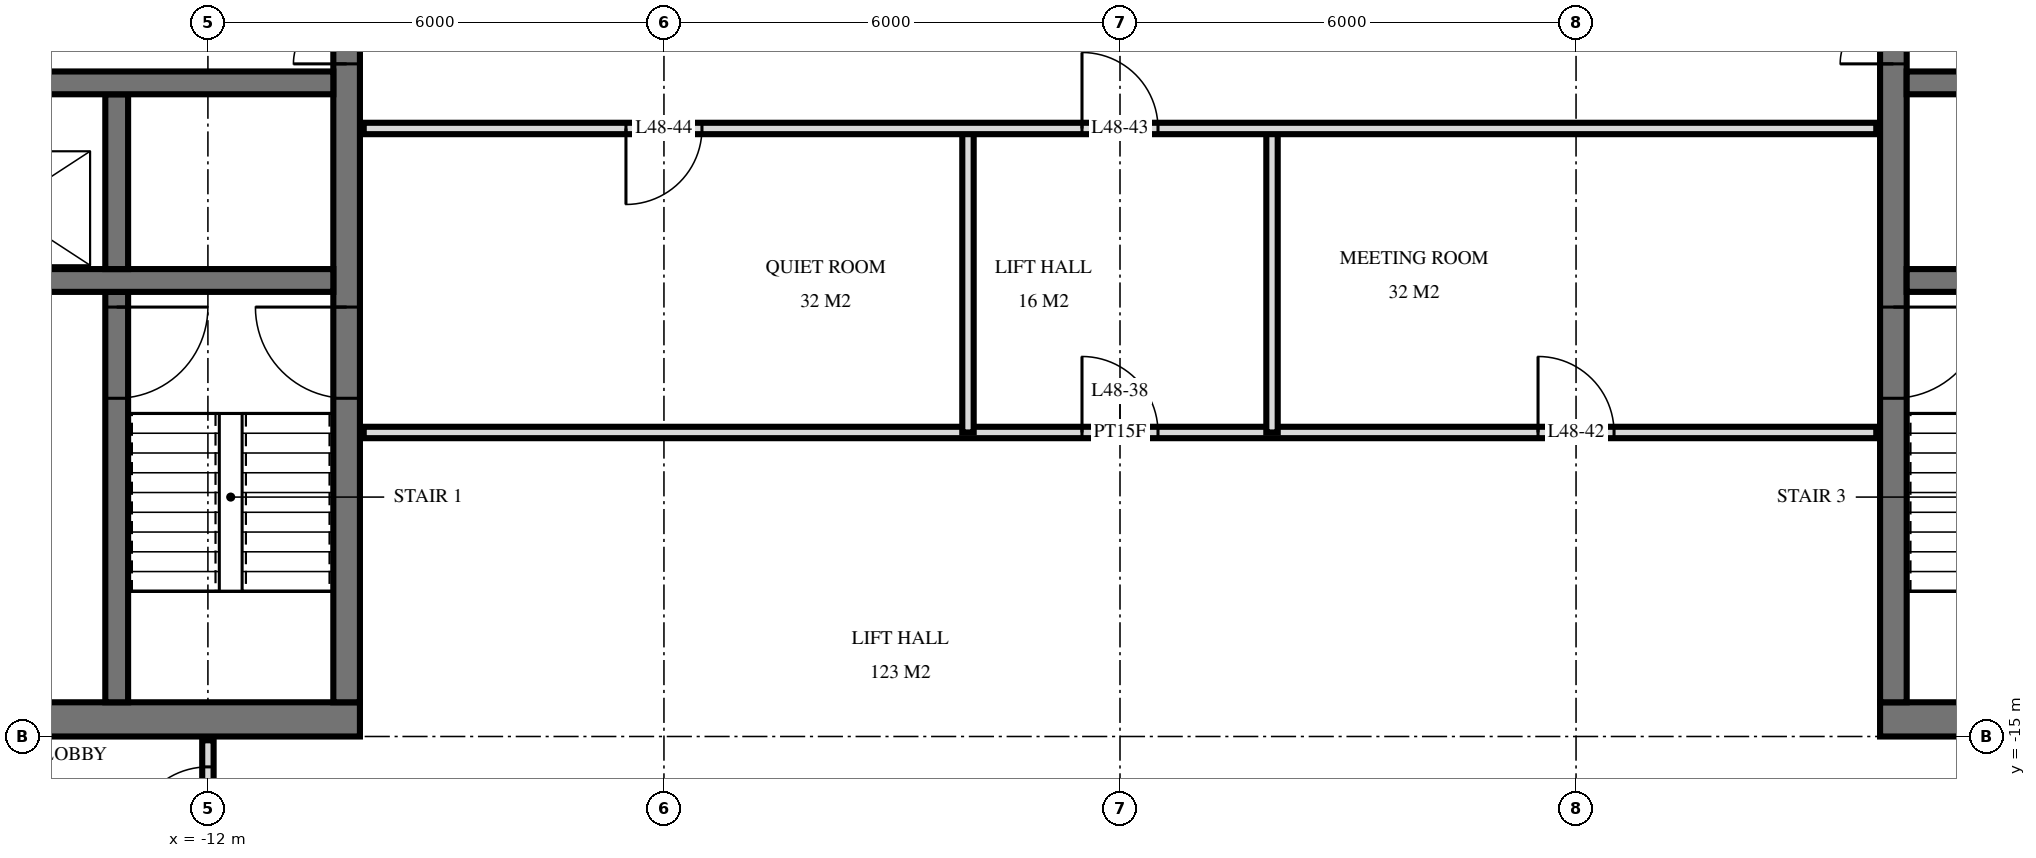
"""IFC4 building model, lengths in metres.
Left out: names, types, materials, properties, quantities, classifications, styles, units other than length and angle.
Written with IfcOpenShell. Run it as: python <this file> out.ifc"""

import sys

from ifc_helpers import new_model, si_unit, direction, frame, frame_2d, origin, place, context, subcontext, project, spatial, rectangle, extrude, element, fill, save


model = new_model("IFC4")
c1 = context("Model", 3, precision=1e-05, world=origin(), true_north=direction((0.0, 1.0)))
c2 = subcontext(c1, "Body", "Model", "MODEL_VIEW")
j1 = project(units=[si_unit("LENGTHUNIT", "METRE"), si_unit("PLANEANGLEUNIT", "RADIAN")], contexts=[c1])
p1 = place(None, origin())
s1 = spatial("IfcSite", under=j1, at=p1, CompositionType="ELEMENT")
p2 = place(p1, origin())
s2 = spatial("IfcBuilding", under=s1, at=p2, CompositionType="ELEMENT")
p3 = place(p2, frame((0.0, 0.0, 187.1)))
s3 = spatial("IfcBuildingStorey", under=s2, at=p3, CompositionType="ELEMENT", Elevation=187.1)
p4 = place(p3, frame((-24.5, -14.775, 0.0), z_axis=(0.0, 0.0, 1.0), x_axis=(1.0, 0.0, 0.0)))
e1 = element("IfcWall", 1, at=p4, inside=s3, PredefinedType="SHEAR", context=c2, shape_type="SweptSolid", body=[
    extrude(rectangle(XDim=14.5, YDim=0.45, at=frame_2d((7.25, 0.0))), origin(), (0.0, 0.0, 1.0), 3.5),
])
p5 = place(p4, frame((6.2, 0.0, 0.0)))
e2 = element("IfcOpeningElement", 2, at=p5, cuts=e1, PredefinedType="OPENING", context=c2, shape_type="SweptSolid", body=[
    extrude(rectangle(XDim=1.2, YDim=2.1, at=frame_2d((0.6, 1.05))), frame((0.0, 0.235, 0.0), z_axis=(0.0, -1.0, 0.0), x_axis=(1.0, 0.0, 0.0)), (0.0, 0.0, 1.0), 0.47),
])
p6 = place(p4, frame((9.25, 0.0, 0.0)))
e3 = element("IfcOpeningElement", 3, at=p6, cuts=e1, PredefinedType="OPENING", context=c2, shape_type="SweptSolid", body=[
    extrude(rectangle(XDim=1.1, YDim=2.1, at=frame_2d((0.55, 1.05))), frame((0.0, 0.235, 0.0), z_axis=(0.0, -1.0, 0.0), x_axis=(1.0, 0.0, 0.0)), (0.0, 0.0, 1.0), 0.47),
])
p7 = place(p4, frame((3.5, 0.0, 0.0)))
e4 = element("IfcOpeningElement", 4, at=p7, cuts=e1, PredefinedType="OPENING", context=c2, shape_type="SweptSolid", body=[
    extrude(rectangle(XDim=0.9, YDim=2.1, at=frame_2d((0.45, 1.05))), frame((0.0, 0.235, 0.0), z_axis=(0.0, -1.0, 0.0), x_axis=(1.0, 0.0, 0.0)), (0.0, 0.0, 1.0), 0.47),
])
p8 = place(p4, frame((1.05, 0.0, 0.0)))
e5 = element("IfcOpeningElement", 5, at=p8, cuts=e1, PredefinedType="OPENING", context=c2, shape_type="SweptSolid", body=[
    extrude(rectangle(XDim=1.0, YDim=2.1, at=frame_2d((0.5, 1.05))), frame((0.0, 0.235, 0.0), z_axis=(0.0, -1.0, 0.0), x_axis=(1.0, 0.0, 0.0)), (0.0, 0.0, 1.0), 0.47),
])
p9 = place(p3, frame((-10.175, -14.55, 0.0), z_axis=(0.0, 0.0, 1.0), x_axis=(0.0, 1.0, 0.0)))
e6 = element("IfcWall", 6, at=p9, inside=s3, PredefinedType="SHEAR", context=c2, shape_type="SweptSolid", body=[
    extrude(rectangle(XDim=14.1, YDim=0.35, at=frame_2d((7.05, 0.0))), origin(), (0.0, 0.0, 1.0), 3.5),
])
p10 = place(p9, frame((8.4, 0.0, 0.0)))
e7 = element("IfcOpeningElement", 7, at=p10, cuts=e6, PredefinedType="OPENING", context=c2, shape_type="SweptSolid", body=[
    extrude(rectangle(XDim=1.4, YDim=2.4, at=frame_2d((0.7, 1.2))), frame((0.0, 0.185, 0.0), z_axis=(0.0, -1.0, 0.0), x_axis=(1.0, 0.0, 0.0)), (0.0, 0.0, 1.0), 0.37),
])
p11 = place(p9, frame((10.0, 0.0, 0.0)))
e8 = element("IfcOpeningElement", 8, at=p11, cuts=e6, PredefinedType="OPENING", context=c2, shape_type="SweptSolid", body=[
    extrude(rectangle(XDim=1.4, YDim=2.4, at=frame_2d((0.7, 1.2))), frame((0.0, 0.185, 0.0), z_axis=(0.0, -1.0, 0.0), x_axis=(1.0, 0.0, 0.0)), (0.0, 0.0, 1.0), 0.37),
])
p12 = place(p9, frame((4.0, 0.0, 0.0)))
e9 = element("IfcOpeningElement", 9, at=p12, cuts=e6, PredefinedType="OPENING", context=c2, shape_type="SweptSolid", body=[
    extrude(rectangle(XDim=1.2, YDim=2.1, at=frame_2d((0.6, 1.05))), frame((0.0, 0.185, 0.0), z_axis=(0.0, -1.0, 0.0), x_axis=(1.0, 0.0, 0.0)), (0.0, 0.0, 1.0), 0.37),
])
p13 = place(p3, frame((-24.05, -6.4, 0.0), z_axis=(0.0, 0.0, 1.0), x_axis=(1.0, 0.0, 0.0)))
e10 = element("IfcWall", 10, at=p13, inside=s3, PredefinedType="SHEAR", context=c2, shape_type="SweptSolid", body=[
    extrude(rectangle(XDim=13.7, YDim=0.3, at=frame_2d((6.85, 0.0))), origin(), (0.0, 0.0, 1.0), 3.5),
])
p14 = place(p13, frame((0.55, 0.0, 0.0)))
e11 = element("IfcOpeningElement", 11, at=p14, cuts=e10, PredefinedType="OPENING", context=c2, shape_type="SweptSolid", body=[
    extrude(rectangle(XDim=1.1, YDim=2.1, at=frame_2d((0.55, 1.05))), frame((0.0, 0.16, 0.0), z_axis=(0.0, -1.0, 0.0), x_axis=(1.0, 0.0, 0.0)), (0.0, 0.0, 1.0), 0.32),
])
p15 = place(p13, frame((5.8, 0.0, 0.0)))
e12 = element("IfcOpeningElement", 12, at=p15, cuts=e10, PredefinedType="OPENING", context=c2, shape_type="SweptSolid", body=[
    extrude(rectangle(XDim=1.1, YDim=2.1, at=frame_2d((0.55, 1.05))), frame((0.0, 0.16, 0.0), z_axis=(0.0, -1.0, 0.0), x_axis=(1.0, 0.0, 0.0)), (0.0, 0.0, 1.0), 0.32),
])
p16 = place(p3, frame((-24.05, -9.0, 0.0), z_axis=(0.0, 0.0, 1.0), x_axis=(1.0, 0.0, 0.0)))
e13 = element("IfcWall", 13, at=p16, inside=s3, PredefinedType="SHEAR", context=c2, shape_type="SweptSolid", body=[
    extrude(rectangle(XDim=13.7, YDim=0.3, at=frame_2d((6.85, 0.0))), origin(), (0.0, 0.0, 1.0), 3.5),
])
p17 = place(p16, frame((8.8, 0.0, 0.0)))
e14 = element("IfcOpeningElement", 14, at=p17, cuts=e13, PredefinedType="OPENING", context=c2, shape_type="SweptSolid", body=[
    extrude(rectangle(XDim=1.1, YDim=2.1, at=frame_2d((0.55, 1.05))), frame((0.0, 0.16, 0.0), z_axis=(0.0, -1.0, 0.0), x_axis=(1.0, 0.0, 0.0)), (0.0, 0.0, 1.0), 0.32),
])
p18 = place(p3, frame((-13.2, -8.85, 0.0), z_axis=(0.0, 0.0, 1.0), x_axis=(0.0, 1.0, 0.0)))
e15 = element("IfcWall", 15, at=p18, inside=s3, PredefinedType="SHEAR", context=c2, shape_type="SweptSolid", body=[
    extrude(rectangle(XDim=2.3, YDim=0.3, at=frame_2d((1.15, 0.0))), origin(), (0.0, 0.0, 1.0), 3.5),
])
p19 = place(p3, frame((-13.2, -14.55, 0.0), z_axis=(0.0, 0.0, 1.0), x_axis=(0.0, 1.0, 0.0)))
e16 = element("IfcWall", 16, at=p19, inside=s3, PredefinedType="SHEAR", context=c2, shape_type="SweptSolid", body=[
    extrude(rectangle(XDim=5.4, YDim=0.3, at=frame_2d((2.7, 0.0))), origin(), (0.0, 0.0, 1.0), 3.5),
])
p20 = place(p19, frame((4.0, 0.0, 0.0)))
e17 = element("IfcOpeningElement", 17, at=p20, cuts=e16, PredefinedType="OPENING", context=c2, shape_type="SweptSolid", body=[
    extrude(rectangle(XDim=1.2, YDim=2.1, at=frame_2d((0.6, 1.05))), frame((0.0, 0.16, 0.0), z_axis=(0.0, -1.0, 0.0), x_axis=(1.0, 0.0, 0.0)), (0.0, 0.0, 1.0), 0.32),
])
p21 = place(p3, frame((10.0, -14.775, 0.0), z_axis=(0.0, 0.0, 1.0), x_axis=(1.0, 0.0, 0.0)))
e18 = element("IfcWall", 18, at=p21, inside=s3, PredefinedType="SHEAR", context=c2, shape_type="SweptSolid", body=[
    extrude(rectangle(XDim=14.5, YDim=0.45, at=frame_2d((7.25, 0.0))), origin(), (0.0, 0.0, 1.0), 3.5),
])
p22 = place(p21, frame((7.1, 0.0, 0.0)))
e19 = element("IfcOpeningElement", 19, at=p22, cuts=e18, PredefinedType="OPENING", context=c2, shape_type="SweptSolid", body=[
    extrude(rectangle(XDim=1.2, YDim=2.1, at=frame_2d((0.6, 1.05))), frame((0.0, 0.235, 0.0), z_axis=(0.0, -1.0, 0.0), x_axis=(1.0, 0.0, 0.0)), (0.0, 0.0, 1.0), 0.47),
])
p23 = place(p21, frame((4.15, 0.0, 0.0)))
e20 = element("IfcOpeningElement", 20, at=p23, cuts=e18, PredefinedType="OPENING", context=c2, shape_type="SweptSolid", body=[
    extrude(rectangle(XDim=1.1, YDim=2.1, at=frame_2d((0.55, 1.05))), frame((0.0, 0.235, 0.0), z_axis=(0.0, -1.0, 0.0), x_axis=(1.0, 0.0, 0.0)), (0.0, 0.0, 1.0), 0.47),
])
p24 = place(p21, frame((10.1, 0.0, 0.0)))
e21 = element("IfcOpeningElement", 21, at=p24, cuts=e18, PredefinedType="OPENING", context=c2, shape_type="SweptSolid", body=[
    extrude(rectangle(XDim=0.9, YDim=2.1, at=frame_2d((0.45, 1.05))), frame((0.0, 0.235, 0.0), z_axis=(0.0, -1.0, 0.0), x_axis=(1.0, 0.0, 0.0)), (0.0, 0.0, 1.0), 0.47),
])
p25 = place(p21, frame((12.45, 0.0, 0.0)))
e22 = element("IfcOpeningElement", 22, at=p25, cuts=e18, PredefinedType="OPENING", context=c2, shape_type="SweptSolid", body=[
    extrude(rectangle(XDim=1.0, YDim=2.1, at=frame_2d((0.5, 1.05))), frame((0.0, 0.235, 0.0), z_axis=(0.0, -1.0, 0.0), x_axis=(1.0, 0.0, 0.0)), (0.0, 0.0, 1.0), 0.47),
])
p26 = place(p3, frame((10.175, -14.55, 0.0), z_axis=(0.0, 0.0, 1.0), x_axis=(0.0, 1.0, 0.0)))
e23 = element("IfcWall", 23, at=p26, inside=s3, PredefinedType="SHEAR", context=c2, shape_type="SweptSolid", body=[
    extrude(rectangle(XDim=14.1, YDim=0.35, at=frame_2d((7.05, 0.0))), origin(), (0.0, 0.0, 1.0), 3.5),
])
p27 = place(p26, frame((8.4, 0.0, 0.0)))
e24 = element("IfcOpeningElement", 24, at=p27, cuts=e23, PredefinedType="OPENING", context=c2, shape_type="SweptSolid", body=[
    extrude(rectangle(XDim=1.4, YDim=2.4, at=frame_2d((0.7, 1.2))), frame((0.0, 0.185, 0.0), z_axis=(0.0, -1.0, 0.0), x_axis=(1.0, 0.0, 0.0)), (0.0, 0.0, 1.0), 0.37),
])
p28 = place(p26, frame((10.0, 0.0, 0.0)))
e25 = element("IfcOpeningElement", 25, at=p28, cuts=e23, PredefinedType="OPENING", context=c2, shape_type="SweptSolid", body=[
    extrude(rectangle(XDim=1.4, YDim=2.4, at=frame_2d((0.7, 1.2))), frame((0.0, 0.185, 0.0), z_axis=(0.0, -1.0, 0.0), x_axis=(1.0, 0.0, 0.0)), (0.0, 0.0, 1.0), 0.37),
])
p29 = place(p26, frame((4.0, 0.0, 0.0)))
e26 = element("IfcOpeningElement", 26, at=p29, cuts=e23, PredefinedType="OPENING", context=c2, shape_type="SweptSolid", body=[
    extrude(rectangle(XDim=1.2, YDim=2.1, at=frame_2d((0.6, 1.05))), frame((0.0, 0.185, 0.0), z_axis=(0.0, -1.0, 0.0), x_axis=(1.0, 0.0, 0.0)), (0.0, 0.0, 1.0), 0.37),
])
p30 = place(p3, frame((10.35, -6.4, 0.0), z_axis=(0.0, 0.0, 1.0), x_axis=(1.0, 0.0, 0.0)))
e27 = element("IfcWall", 27, at=p30, inside=s3, PredefinedType="SHEAR", context=c2, shape_type="SweptSolid", body=[
    extrude(rectangle(XDim=13.7, YDim=0.3, at=frame_2d((6.85, 0.0))), origin(), (0.0, 0.0, 1.0), 3.5),
])
p31 = place(p30, frame((12.05, 0.0, 0.0)))
e28 = element("IfcOpeningElement", 28, at=p31, cuts=e27, PredefinedType="OPENING", context=c2, shape_type="SweptSolid", body=[
    extrude(rectangle(XDim=1.1, YDim=2.1, at=frame_2d((0.55, 1.05))), frame((0.0, 0.16, 0.0), z_axis=(0.0, -1.0, 0.0), x_axis=(1.0, 0.0, 0.0)), (0.0, 0.0, 1.0), 0.32),
])
p32 = place(p30, frame((6.8, 0.0, 0.0)))
e29 = element("IfcOpeningElement", 29, at=p32, cuts=e27, PredefinedType="OPENING", context=c2, shape_type="SweptSolid", body=[
    extrude(rectangle(XDim=1.1, YDim=2.1, at=frame_2d((0.55, 1.05))), frame((0.0, 0.16, 0.0), z_axis=(0.0, -1.0, 0.0), x_axis=(1.0, 0.0, 0.0)), (0.0, 0.0, 1.0), 0.32),
])
p33 = place(p3, frame((10.35, -9.0, 0.0), z_axis=(0.0, 0.0, 1.0), x_axis=(1.0, 0.0, 0.0)))
e30 = element("IfcWall", 30, at=p33, inside=s3, PredefinedType="SHEAR", context=c2, shape_type="SweptSolid", body=[
    extrude(rectangle(XDim=13.7, YDim=0.3, at=frame_2d((6.85, 0.0))), origin(), (0.0, 0.0, 1.0), 3.5),
])
p34 = place(p33, frame((3.8, 0.0, 0.0)))
e31 = element("IfcOpeningElement", 31, at=p34, cuts=e30, PredefinedType="OPENING", context=c2, shape_type="SweptSolid", body=[
    extrude(rectangle(XDim=1.1, YDim=2.1, at=frame_2d((0.55, 1.05))), frame((0.0, 0.16, 0.0), z_axis=(0.0, -1.0, 0.0), x_axis=(1.0, 0.0, 0.0)), (0.0, 0.0, 1.0), 0.32),
])
for number, where, z_axis, x_axis in (
    (32, (2.0, -11.0, 0.0), (0.0, 0.0, 1.0), (0.0, 1.0, 0.0)),
    (33, (-2.0, -11.0, 0.0), (0.0, 0.0, 1.0), (0.0, 1.0, 0.0)),
):
    element("IfcWall", number, at=place(p3, frame(where, z_axis=z_axis, x_axis=x_axis)), inside=s3, PredefinedType="PARTITIONING", context=c2, shape_type="SweptSolid", body=[
        extrude(rectangle(XDim=4.0, YDim=0.15, at=frame_2d((2.0, 0.0))), origin(), (0.0, 0.0, 1.0), 3.22),
    ])
p35 = place(p3, frame((-12.0, -16.8, 0.0), z_axis=(0.0, 0.0, 1.0), x_axis=(0.0, 1.0, 0.0)))
e34 = element("IfcWall", 34, at=p35, inside=s3, PredefinedType="PARTITIONING", context=c2, shape_type="SweptSolid", body=[
    extrude(rectangle(XDim=1.75, YDim=0.15, at=frame_2d((0.875, 0.0))), origin(), (0.0, 0.0, 1.0), 3.22),
])
p36 = place(p35, frame((0.4, 0.0, 0.0)))
e35 = element("IfcOpeningElement", 35, at=p36, cuts=e34, PredefinedType="OPENING", context=c2, shape_type="SweptSolid", body=[
    extrude(rectangle(XDim=1.0, YDim=2.1, at=frame_2d((0.5, 1.05))), frame((0.0, 0.085, 0.0), z_axis=(0.0, -1.0, 0.0), x_axis=(1.0, 0.0, 0.0)), (0.0, 0.0, 1.0), 0.17),
])
p37 = place(p3, frame((-9.95, -11.0, 0.0), z_axis=(0.0, 0.0, 1.0), x_axis=(1.0, 0.0, 0.0)))
e36 = element("IfcWall", 36, at=p37, inside=s3, PredefinedType="PARTITIONING", context=c2, shape_type="SweptSolid", body=[
    extrude(rectangle(XDim=19.9, YDim=0.15, at=frame_2d((9.95, 0.0))), origin(), (0.0, 0.0, 1.0), 3.22),
])
p38 = place(p37, frame((9.45, 0.0, 0.0)))
e37 = element("IfcOpeningElement", 37, at=p38, cuts=e36, PredefinedType="OPENING", context=c2, shape_type="SweptSolid", body=[
    extrude(rectangle(XDim=1.0, YDim=2.1, at=frame_2d((0.5, 1.05))), frame((0.0, 0.085, 0.0), z_axis=(0.0, -1.0, 0.0), x_axis=(1.0, 0.0, 0.0)), (0.0, 0.0, 1.0), 0.17),
])
p39 = place(p37, frame((15.45, 0.0, 0.0)))
e38 = element("IfcOpeningElement", 38, at=p39, cuts=e36, PredefinedType="OPENING", context=c2, shape_type="SweptSolid", body=[
    extrude(rectangle(XDim=1.0, YDim=2.1, at=frame_2d((0.5, 1.05))), frame((0.0, 0.085, 0.0), z_axis=(0.0, -1.0, 0.0), x_axis=(1.0, 0.0, 0.0)), (0.0, 0.0, 1.0), 0.17),
])
p40 = place(p3, frame((-9.95, -7.0, 0.0), z_axis=(0.0, 0.0, 1.0), x_axis=(1.0, 0.0, 0.0)))
e39 = element("IfcWall", 39, at=p40, inside=s3, PredefinedType="PARTITIONING", context=c2, shape_type="SweptSolid", body=[
    extrude(rectangle(XDim=19.9, YDim=0.15, at=frame_2d((9.95, 0.0))), origin(), (0.0, 0.0, 1.0), 3.22),
])
p41 = place(p40, frame((9.45, 0.0, 0.0)))
e40 = element("IfcOpeningElement", 40, at=p41, cuts=e39, PredefinedType="OPENING", context=c2, shape_type="SweptSolid", body=[
    extrude(rectangle(XDim=1.0, YDim=2.1, at=frame_2d((0.5, 1.05))), frame((0.0, 0.085, 0.0), z_axis=(0.0, -1.0, 0.0), x_axis=(1.0, 0.0, 0.0)), (0.0, 0.0, 1.0), 0.17),
])
p42 = place(p40, frame((3.45, 0.0, 0.0)))
e41 = element("IfcOpeningElement", 41, at=p42, cuts=e39, PredefinedType="OPENING", context=c2, shape_type="SweptSolid", body=[
    extrude(rectangle(XDim=1.0, YDim=2.1, at=frame_2d((0.5, 1.05))), frame((0.0, 0.085, 0.0), z_axis=(0.0, -1.0, 0.0), x_axis=(1.0, 0.0, 0.0)), (0.0, 0.0, 1.0), 0.17),
])
p43 = place(p10, origin())
e42 = element("IfcDoor", 42, at=p43, inside=s3, OperationType="DOUBLE_DOOR_SINGLE_SWING", PredefinedType="DOOR", context=c2, shape_type="SweptSolid", body=[
    extrude(rectangle(XDim=1.4, YDim=2.4, at=frame_2d((0.7, 1.2))), frame((0.0, 0.025, 0.0), z_axis=(0.0, -1.0, 0.0), x_axis=(1.0, 0.0, 0.0)), (0.0, 0.0, 1.0), 0.05),
])
fill(e7, e42)
p44 = place(p12, origin())
e43 = element("IfcDoor", 43, at=p44, inside=s3, OperationType="SINGLE_SWING_LEFT", PredefinedType="DOOR", context=c2, shape_type="SweptSolid", body=[
    extrude(rectangle(XDim=1.2, YDim=2.1, at=frame_2d((0.6, 1.05))), frame((0.0, 0.025, 0.0), z_axis=(0.0, -1.0, 0.0), x_axis=(1.0, 0.0, 0.0)), (0.0, 0.0, 1.0), 0.05),
])
fill(e9, e43)
p45 = place(p20, frame((0.6, 0.0, 0.0), z_axis=(0.0, 0.0, 1.0), x_axis=(-1.0, 0.0, 0.0)))
e44 = element("IfcDoor", 44, at=p45, inside=s3, OperationType="SINGLE_SWING_RIGHT", PredefinedType="DOOR", context=c2, shape_type="SweptSolid", body=[
    extrude(rectangle(XDim=1.2, YDim=2.1, at=frame_2d((0.0, 1.05))), frame((0.0, -0.025, 0.0), z_axis=(0.0, 1.0, 0.0), x_axis=(-1.0, 0.0, 0.0)), (0.0, 0.0, 1.0), 0.05),
])
fill(e17, e44)
p46 = place(p27, origin())
e45 = element("IfcDoor", 45, at=p46, inside=s3, OperationType="DOUBLE_DOOR_SINGLE_SWING", PredefinedType="DOOR", context=c2, shape_type="SweptSolid", body=[
    extrude(rectangle(XDim=1.4, YDim=2.4, at=frame_2d((0.7, 1.2))), frame((0.0, 0.025, 0.0), z_axis=(0.0, -1.0, 0.0), x_axis=(1.0, 0.0, 0.0)), (0.0, 0.0, 1.0), 0.05),
])
fill(e24, e45)
p47 = place(p29, frame((0.6, 0.0, 0.0), z_axis=(0.0, 0.0, 1.0), x_axis=(-1.0, 0.0, 0.0)))
e46 = element("IfcDoor", 46, at=p47, inside=s3, OperationType="SINGLE_SWING_RIGHT", PredefinedType="DOOR", context=c2, shape_type="SweptSolid", body=[
    extrude(rectangle(XDim=1.2, YDim=2.1, at=frame_2d((0.0, 1.05))), frame((0.0, -0.025, 0.0), z_axis=(0.0, 1.0, 0.0), x_axis=(-1.0, 0.0, 0.0)), (0.0, 0.0, 1.0), 0.05),
])
fill(e26, e46)
p48 = place(p36, origin())
e47 = element("IfcDoor", 47, at=p48, inside=s3, OperationType="SINGLE_SWING_RIGHT", PredefinedType="DOOR", context=c2, shape_type="SweptSolid", body=[
    extrude(rectangle(XDim=1.0, YDim=2.1, at=frame_2d((0.5, 1.05))), frame((0.0, 0.025, 0.0), z_axis=(0.0, -1.0, 0.0), x_axis=(1.0, 0.0, 0.0)), (0.0, 0.0, 1.0), 0.05),
])
fill(e35, e47)
p49 = place(p38, origin())
e48 = element("IfcDoor", 48, at=p49, inside=s3, OperationType="SINGLE_SWING_RIGHT", PredefinedType="DOOR", context=c2, shape_type="SweptSolid", body=[
    extrude(rectangle(XDim=1.0, YDim=2.1, at=frame_2d((0.5, 1.05))), frame((0.0, 0.025, 0.0), z_axis=(0.0, -1.0, 0.0), x_axis=(1.0, 0.0, 0.0)), (0.0, 0.0, 1.0), 0.05),
])
fill(e37, e48)
p50 = place(p39, origin())
e49 = element("IfcDoor", 49, at=p50, inside=s3, OperationType="SINGLE_SWING_RIGHT", PredefinedType="DOOR", context=c2, shape_type="SweptSolid", body=[
    extrude(rectangle(XDim=1.0, YDim=2.1, at=frame_2d((0.5, 1.05))), frame((0.0, 0.025, 0.0), z_axis=(0.0, -1.0, 0.0), x_axis=(1.0, 0.0, 0.0)), (0.0, 0.0, 1.0), 0.05),
])
fill(e38, e49)
p51 = place(p41, origin())
e50 = element("IfcDoor", 50, at=p51, inside=s3, OperationType="SINGLE_SWING_RIGHT", PredefinedType="DOOR", context=c2, shape_type="SweptSolid", body=[
    extrude(rectangle(XDim=1.0, YDim=2.1, at=frame_2d((0.5, 1.05))), frame((0.0, 0.025, 0.0), z_axis=(0.0, -1.0, 0.0), x_axis=(1.0, 0.0, 0.0)), (0.0, 0.0, 1.0), 0.05),
])
fill(e40, e50)
p52 = place(p42, frame((0.5, 0.0, 0.0), z_axis=(0.0, 0.0, 1.0), x_axis=(-1.0, 0.0, 0.0)))
e51 = element("IfcDoor", 51, at=p52, inside=s3, OperationType="SINGLE_SWING_LEFT", PredefinedType="DOOR", context=c2, shape_type="SweptSolid", body=[
    extrude(rectangle(XDim=1.0, YDim=2.1, at=frame_2d((0.0, 1.05))), frame((0.0, -0.025, 0.0), z_axis=(0.0, 1.0, 0.0), x_axis=(-1.0, 0.0, 0.0)), (0.0, 0.0, 1.0), 0.05),
])
fill(e41, e51)
save(model, sys.argv[1])
